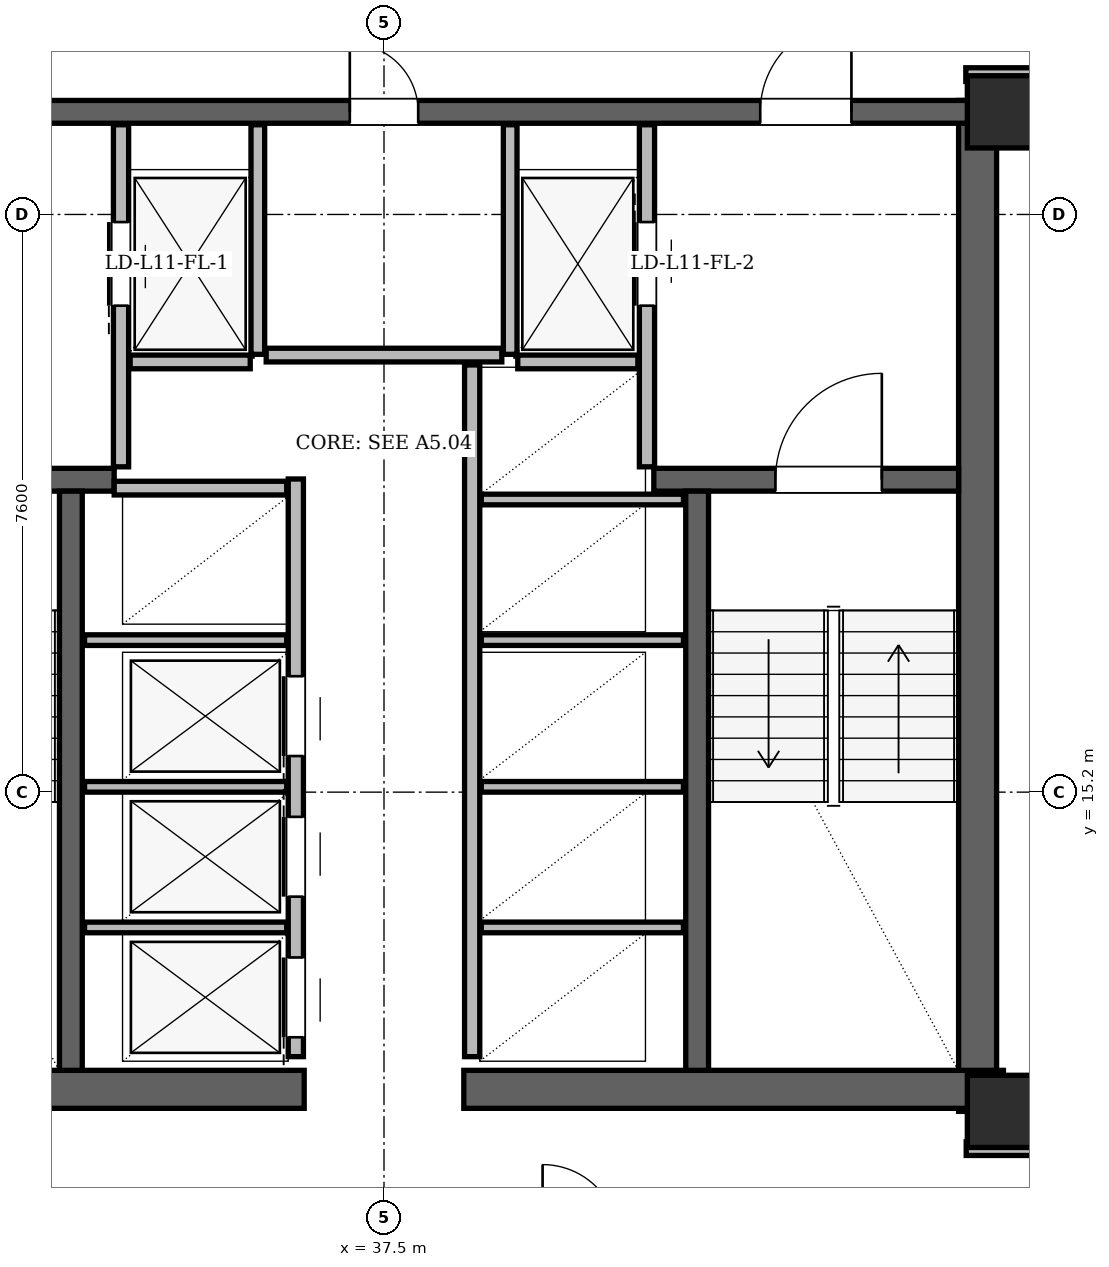
"""IFC4 building model, lengths in metres.
Left out: names, types, materials, properties, quantities, classifications, styles, units other than length and angle.
Written with IfcOpenShell. Run it as: python <this file> out.ifc"""

import sys

from ifc_helpers import new_model, si_unit, direction, frame, frame_2d, origin, origin_2d, place, context, subcontext, project, spatial, rectangle, hollow_rectangle, extrude, element, fill, save


model = new_model("IFC4")
c1 = context("Model", 3, precision=1e-05, world=origin(), true_north=direction((0.0, 1.0)))
c2 = subcontext(c1, "Body", "Model", "MODEL_VIEW")
j1 = project(units=[si_unit("LENGTHUNIT", "METRE"), si_unit("PLANEANGLEUNIT", "RADIAN")], contexts=[c1])
p1 = place(None, origin())
s1 = spatial("IfcSite", under=j1, at=p1, CompositionType="ELEMENT")
p2 = place(p1, origin())
s2 = spatial("IfcBuilding", under=s1, at=p2, CompositionType="ELEMENT")
p3 = place(p2, frame((0.0, 0.0, 45.3)))
s3 = spatial("IfcBuildingStorey", under=s2, at=p3, CompositionType="ELEMENT", Elevation=45.3)
for number, where, z_axis, x_axis in (
    (1, (45.65, 11.0, 0.0), (0.0, 0.0, 1.0), (1.0, 0.0, 0.0)),
    (2, (45.65, 24.15, 0.0), (0.0, 0.0, 1.0), (1.0, 0.0, 0.0)),
):
    element("IfcColumn", number, at=place(p3, frame(where, z_axis=z_axis, x_axis=x_axis)), inside=s3, PredefinedType="COLUMN", context=c2, shape_type="SweptSolid", body=[
        extrude(hollow_rectangle(XDim=0.95, YDim=0.95, WallThickness=0.08, at=origin_2d()), origin(), (0.0, 0.0, 1.0), 3.6),
    ])
p4 = place(p3, frame((45.31, 11.0, 0.0), z_axis=(0.0, 0.0, 1.0), x_axis=(0.0, 1.0, 0.0)))
e3 = element("IfcWall", 3, at=p4, inside=s3, PredefinedType="SHEAR", context=c2, shape_type="SweptSolid", body=[
    extrude(rectangle(XDim=13.3, YDim=0.5, at=frame_2d((6.65, 0.0))), origin(), (0.0, 0.0, 1.0), 3.36),
])
for number, where, z_axis, x_axis in (
    (4, (29.35, 11.29, 0.0), (0.0, 0.0, 1.0), (1.0, 0.0, 0.0)),
    (5, (38.55, 11.29, 0.0), (0.0, 0.0, 1.0), (1.0, 0.0, 0.0)),
):
    element("IfcWall", number, at=place(p3, frame(where, z_axis=z_axis, x_axis=x_axis)), inside=s3, PredefinedType="SHEAR", context=c2, shape_type="SweptSolid", body=[
        extrude(rectangle(XDim=7.1, YDim=0.5, at=frame_2d((3.55, 0.0))), origin(), (0.0, 0.0, 1.0), 3.36),
    ])
p5 = place(p3, frame((29.65, 24.15, 0.0), z_axis=(0.0, 0.0, 1.0), x_axis=(1.0, 0.0, 0.0)))
e6 = element("IfcWall", 6, at=p5, inside=s3, PredefinedType="SHEAR", context=c2, shape_type="SweptSolid", body=[
    extrude(rectangle(XDim=15.7, YDim=0.3, at=frame_2d((7.85, 0.0))), origin(), (0.0, 0.0, 1.0), 3.36),
])
p6 = place(p5, frame((1.7, 0.0, 0.0)))
e7 = element("IfcOpeningElement", 7, at=p6, cuts=e6, PredefinedType="OPENING", context=c2, shape_type="SweptSolid", body=[
    extrude(rectangle(XDim=1.2, YDim=2.2, at=frame_2d((0.6, 1.1))), frame((0.0, 0.15, 0.0), z_axis=(0.0, -1.0, 0.0), x_axis=(1.0, 0.0, 0.0)), (0.0, 0.0, 1.0), 0.3),
])
p7 = place(p5, frame((12.8, 0.0, 0.0)))
e8 = element("IfcOpeningElement", 8, at=p7, cuts=e6, PredefinedType="OPENING", context=c2, shape_type="SweptSolid", body=[
    extrude(rectangle(XDim=1.2, YDim=2.2, at=frame_2d((0.6, 1.1))), frame((0.0, 0.15, 0.0), z_axis=(0.0, -1.0, 0.0), x_axis=(1.0, 0.0, 0.0)), (0.0, 0.0, 1.0), 0.3),
])
p8 = place(p5, frame((7.4, 0.0, 0.0)))
e9 = element("IfcOpeningElement", 9, at=p8, cuts=e6, PredefinedType="OPENING", context=c2, shape_type="SweptSolid", body=[
    extrude(rectangle(XDim=0.9, YDim=2.05, at=frame_2d((0.45, 1.025))), frame((0.0, 0.15, 0.0), z_axis=(0.0, -1.0, 0.0), x_axis=(1.0, 0.0, 0.0)), (0.0, 0.0, 1.0), 0.3),
])
p9 = place(p3, frame((29.94, 19.31, 0.0), z_axis=(0.0, 0.0, 1.0), x_axis=(1.0, 0.0, 0.0)))
e10 = element("IfcWall", 10, at=p9, inside=s3, PredefinedType="SHEAR", context=c2, shape_type="SweptSolid", body=[
    extrude(rectangle(XDim=4.01, YDim=0.3, at=frame_2d((2.005, 0.0))), origin(), (0.0, 0.0, 1.0), 3.36),
])
p10 = place(p9, frame((1.01, 0.0, 0.0)))
e11 = element("IfcOpeningElement", 11, at=p10, cuts=e10, PredefinedType="OPENING", context=c2, shape_type="SweptSolid", body=[
    extrude(rectangle(XDim=1.4, YDim=2.2, at=frame_2d((0.7, 1.1))), frame((0.0, 0.15, 0.0), z_axis=(0.0, -1.0, 0.0), x_axis=(1.0, 0.0, 0.0)), (0.0, 0.0, 1.0), 0.3),
])
p11 = place(p3, frame((41.05, 19.31, 0.0), z_axis=(0.0, 0.0, 1.0), x_axis=(1.0, 0.0, 0.0)))
e12 = element("IfcWall", 12, at=p11, inside=s3, PredefinedType="SHEAR", context=c2, shape_type="SweptSolid", body=[
    extrude(rectangle(XDim=4.01, YDim=0.3, at=frame_2d((2.005, 0.0))), origin(), (0.0, 0.0, 1.0), 3.36),
])
p12 = place(p11, frame((1.6, 0.0, 0.0)))
e13 = element("IfcOpeningElement", 13, at=p12, cuts=e12, PredefinedType="OPENING", context=c2, shape_type="SweptSolid", body=[
    extrude(rectangle(XDim=1.4, YDim=2.2, at=frame_2d((0.7, 1.1))), frame((0.0, 0.15, 0.0), z_axis=(0.0, -1.0, 0.0), x_axis=(1.0, 0.0, 0.0)), (0.0, 0.0, 1.0), 0.3),
])
for number, where, z_axis, x_axis in (
    (14, (33.38, 11.54, 0.0), (0.0, 0.0, 1.0), (0.0, 1.0, 0.0)),
    (15, (41.62, 11.54, 0.0), (0.0, 0.0, 1.0), (0.0, 1.0, 0.0)),
):
    element("IfcWall", number, at=place(p3, frame(where, z_axis=z_axis, x_axis=x_axis)), inside=s3, PredefinedType="SHEAR", context=c2, shape_type="SweptSolid", body=[
        extrude(rectangle(XDim=7.62, YDim=0.3, at=frame_2d((3.81, 0.0))), origin(), (0.0, 0.0, 1.0), 3.36),
    ])
p13 = place(p3, frame((61.584, 14.829, 0.0), z_axis=(0.0, 0.0, 1.0), x_axis=(-0.500004112523, 0.866023029405, 0.0)))
e16 = element("IfcWall", 16, at=p13, inside=s3, PredefinedType="SOLIDWALL", context=c2, shape_type="SweptSolid", body=[
    extrude(rectangle(XDim=33.214, YDim=0.34, at=frame_2d((16.607, 0.0))), origin(), (0.0, 0.0, 1.0), 2.494),
])
p14 = place(p13, frame((7.615, 0.0, 0.0)))
e17 = element("IfcOpeningElement", 17, at=p14, cuts=e16, PredefinedType="OPENING", context=c2, shape_type="SweptSolid", body=[
    extrude(rectangle(XDim=1.5, YDim=2.2, at=frame_2d((0.75, 1.1))), frame((0.0, 0.17, 0.0), z_axis=(0.0, -1.0, 0.0), x_axis=(1.0, 0.0, 0.0)), (0.0, 0.0, 1.0), 0.34),
])
p15 = place(p13, frame((24.925, 0.0, 0.0)))
e18 = element("IfcOpeningElement", 18, at=p15, cuts=e16, PredefinedType="OPENING", context=c2, shape_type="SweptSolid", body=[
    extrude(rectangle(XDim=1.5, YDim=2.2, at=frame_2d((0.75, 1.1))), frame((0.0, 0.17, 0.0), z_axis=(0.0, -1.0, 0.0), x_axis=(1.0, 0.0, 0.0)), (0.0, 0.0, 1.0), 0.34),
])
p16 = place(p13, frame((0.971, 0.0, 0.85)))
e19 = element("IfcOpeningElement", 19, at=p16, cuts=e16, PredefinedType="OPENING", context=c2, shape_type="SweptSolid", body=[
    extrude(rectangle(XDim=1.2, YDim=1.48, at=frame_2d((0.6, 0.74))), frame((0.0, 0.17, 0.0), z_axis=(0.0, -1.0, 0.0), x_axis=(1.0, 0.0, 0.0)), (0.0, 0.0, 1.0), 0.34),
])
p17 = place(p13, frame((2.462, 0.0, 0.85)))
e20 = element("IfcOpeningElement", 20, at=p17, cuts=e16, PredefinedType="OPENING", context=c2, shape_type="SweptSolid", body=[
    extrude(rectangle(XDim=1.2, YDim=1.48, at=frame_2d((0.6, 0.74))), frame((0.0, 0.17, 0.0), z_axis=(0.0, -1.0, 0.0), x_axis=(1.0, 0.0, 0.0)), (0.0, 0.0, 1.0), 0.34),
])
p18 = place(p13, frame((16.965, 0.0, 0.85)))
e21 = element("IfcOpeningElement", 21, at=p18, cuts=e16, PredefinedType="OPENING", context=c2, shape_type="SweptSolid", body=[
    extrude(rectangle(XDim=2.8, YDim=1.534, at=frame_2d((1.4, 0.767))), frame((0.0, 0.17, 0.0), z_axis=(0.0, -1.0, 0.0), x_axis=(1.0, 0.0, 0.0)), (0.0, 0.0, 1.0), 0.34),
])
p19 = place(p13, frame((10.823, 0.0, 0.85)))
e22 = element("IfcOpeningElement", 22, at=p19, cuts=e16, PredefinedType="OPENING", context=c2, shape_type="SweptSolid", body=[
    extrude(rectangle(XDim=1.2, YDim=1.48, at=frame_2d((0.6, 0.74))), frame((0.0, 0.17, 0.0), z_axis=(0.0, -1.0, 0.0), x_axis=(1.0, 0.0, 0.0)), (0.0, 0.0, 1.0), 0.34),
])
p20 = place(p13, frame((13.666, 0.0, 0.85)))
e23 = element("IfcOpeningElement", 23, at=p20, cuts=e16, PredefinedType="OPENING", context=c2, shape_type="SweptSolid", body=[
    extrude(rectangle(XDim=1.2, YDim=1.48, at=frame_2d((0.6, 0.74))), frame((0.0, 0.17, 0.0), z_axis=(0.0, -1.0, 0.0), x_axis=(1.0, 0.0, 0.0)), (0.0, 0.0, 1.0), 0.34),
])
p21 = place(p13, frame((5.859, 0.0, 0.85)))
e24 = element("IfcOpeningElement", 24, at=p21, cuts=e16, PredefinedType="OPENING", context=c2, shape_type="SweptSolid", body=[
    extrude(rectangle(XDim=0.9, YDim=1.15, at=frame_2d((0.45, 0.575))), frame((0.0, 0.17, 0.0), z_axis=(0.0, -1.0, 0.0), x_axis=(1.0, 0.0, 0.0)), (0.0, 0.0, 1.0), 0.34),
])
p22 = place(p3, frame((34.04, 19.48, 0.0), z_axis=(0.0, 0.0, 1.0), x_axis=(0.0, 1.0, 0.0)))
e25 = element("IfcWall", 25, at=p22, inside=s3, PredefinedType="PARTITIONING", context=c2, shape_type="SweptSolid", body=[
    extrude(rectangle(XDim=4.5, YDim=0.2, at=frame_2d((2.25, 0.0))), origin(), (0.0, 0.0, 1.0), 2.4),
])
p23 = place(p22, frame((2.12, 0.0, 0.0)))
e26 = element("IfcOpeningElement", 26, at=p23, cuts=e25, PredefinedType="OPENING", context=c2, shape_type="SweptSolid", body=[
    extrude(rectangle(XDim=1.1, YDim=2.2, at=frame_2d((0.55, 1.1))), frame((0.0, 0.1, 0.0), z_axis=(0.0, -1.0, 0.0), x_axis=(1.0, 0.0, 0.0)), (0.0, 0.0, 1.0), 0.2),
])
p24 = place(p3, frame((35.84, 20.96, 0.0), z_axis=(0.0, 0.0, 1.0), x_axis=(0.0, 1.0, 0.0)))
e27 = element("IfcWall", 27, at=p24, inside=s3, PredefinedType="PARTITIONING", context=c2, shape_type="SweptSolid", body=[
    extrude(rectangle(XDim=3.02, YDim=0.18, at=frame_2d((1.51, 0.0))), origin(), (0.0, 0.0, 1.0), 2.4),
])
p25 = place(p3, frame((34.16, 20.86, 0.0), z_axis=(0.0, 0.0, 1.0), x_axis=(1.0, 0.0, 0.0)))
e28 = element("IfcWall", 28, at=p25, inside=s3, PredefinedType="PARTITIONING", context=c2, shape_type="SweptSolid", body=[
    extrude(rectangle(XDim=1.58, YDim=0.18, at=frame_2d((0.79, 0.0))), origin(), (0.0, 0.0, 1.0), 3.36),
])
p26 = place(p3, frame((40.96, 19.48, 0.0), z_axis=(0.0, 0.0, 1.0), x_axis=(0.0, 1.0, 0.0)))
e29 = element("IfcWall", 29, at=p26, inside=s3, PredefinedType="PARTITIONING", context=c2, shape_type="SweptSolid", body=[
    extrude(rectangle(XDim=4.5, YDim=0.2, at=frame_2d((2.25, 0.0))), origin(), (0.0, 0.0, 1.0), 2.4),
])
p27 = place(p26, frame((2.12, 0.0, 0.0)))
e30 = element("IfcOpeningElement", 30, at=p27, cuts=e29, PredefinedType="OPENING", context=c2, shape_type="SweptSolid", body=[
    extrude(rectangle(XDim=1.1, YDim=2.2, at=frame_2d((0.55, 1.1))), frame((0.0, 0.1, 0.0), z_axis=(0.0, -1.0, 0.0), x_axis=(1.0, 0.0, 0.0)), (0.0, 0.0, 1.0), 0.2),
])
p28 = place(p3, frame((39.16, 20.96, 0.0), z_axis=(0.0, 0.0, 1.0), x_axis=(0.0, 1.0, 0.0)))
e31 = element("IfcWall", 31, at=p28, inside=s3, PredefinedType="PARTITIONING", context=c2, shape_type="SweptSolid", body=[
    extrude(rectangle(XDim=3.02, YDim=0.18, at=frame_2d((1.51, 0.0))), origin(), (0.0, 0.0, 1.0), 2.4),
])
p29 = place(p3, frame((39.26, 20.86, 0.0), z_axis=(0.0, 0.0, 1.0), x_axis=(1.0, 0.0, 0.0)))
e32 = element("IfcWall", 32, at=p29, inside=s3, PredefinedType="PARTITIONING", context=c2, shape_type="SweptSolid", body=[
    extrude(rectangle(XDim=1.58, YDim=0.18, at=frame_2d((0.79, 0.0))), origin(), (0.0, 0.0, 1.0), 3.36),
])
p30 = place(p3, frame((36.34, 11.72, 0.0), z_axis=(0.0, 0.0, 1.0), x_axis=(0.0, 1.0, 0.0)))
e33 = element("IfcWall", 33, at=p30, inside=s3, PredefinedType="PARTITIONING", context=c2, shape_type="SweptSolid", body=[
    extrude(rectangle(XDim=7.6, YDim=0.2, at=frame_2d((3.8, 0.0))), origin(), (0.0, 0.0, 1.0), 3.36),
])
p31 = place(p30, frame((0.255, 0.0, 0.0)))
e34 = element("IfcOpeningElement", 34, at=p31, cuts=e33, PredefinedType="OPENING", context=c2, shape_type="SweptSolid", body=[
    extrude(rectangle(XDim=1.05, YDim=2.15, at=frame_2d((0.525, 1.075))), frame((0.0, 0.1, 0.0), z_axis=(0.0, -1.0, 0.0), x_axis=(1.0, 0.0, 0.0)), (0.0, 0.0, 1.0), 0.2),
])
p32 = place(p30, frame((2.105, 0.0, 0.0)))
e35 = element("IfcOpeningElement", 35, at=p32, cuts=e33, PredefinedType="OPENING", context=c2, shape_type="SweptSolid", body=[
    extrude(rectangle(XDim=1.05, YDim=2.15, at=frame_2d((0.525, 1.075))), frame((0.0, 0.1, 0.0), z_axis=(0.0, -1.0, 0.0), x_axis=(1.0, 0.0, 0.0)), (0.0, 0.0, 1.0), 0.2),
])
p33 = place(p30, frame((3.955, 0.0, 0.0)))
e36 = element("IfcOpeningElement", 36, at=p33, cuts=e33, PredefinedType="OPENING", context=c2, shape_type="SweptSolid", body=[
    extrude(rectangle(XDim=1.05, YDim=2.15, at=frame_2d((0.525, 1.075))), frame((0.0, 0.1, 0.0), z_axis=(0.0, -1.0, 0.0), x_axis=(1.0, 0.0, 0.0)), (0.0, 0.0, 1.0), 0.2),
])
p34 = place(p3, frame((33.95, 19.2, 0.0), z_axis=(0.0, 0.0, 1.0), x_axis=(1.0, 0.0, 0.0)))
e37 = element("IfcWall", 37, at=p34, inside=s3, PredefinedType="PARTITIONING", context=c2, shape_type="SweptSolid", body=[
    extrude(rectangle(XDim=2.27, YDim=0.18, at=frame_2d((1.135, 0.0))), origin(), (0.0, 0.0, 1.0), 3.36),
])
for number, where, z_axis, x_axis in (
    (38, (33.56, 13.42, 0.0), (0.0, 0.0, 1.0), (1.0, 0.0, 0.0)),
    (39, (33.56, 15.27, 0.0), (0.0, 0.0, 1.0), (1.0, 0.0, 0.0)),
    (40, (33.56, 17.2, 0.0), (0.0, 0.0, 1.0), (1.0, 0.0, 0.0)),
):
    element("IfcWall", number, at=place(p3, frame(where, z_axis=z_axis, x_axis=x_axis)), inside=s3, PredefinedType="PARTITIONING", context=c2, shape_type="SweptSolid", body=[
        extrude(rectangle(XDim=2.66, YDim=0.14, at=frame_2d((1.33, 0.0))), origin(), (0.0, 0.0, 1.0), 3.36),
    ])
p35 = place(p3, frame((38.66, 11.72, 0.0), z_axis=(0.0, 0.0, 1.0), x_axis=(0.0, 1.0, 0.0)))
e41 = element("IfcWall", 41, at=p35, inside=s3, PredefinedType="PARTITIONING", context=c2, shape_type="SweptSolid", body=[
    extrude(rectangle(XDim=9.1, YDim=0.2, at=frame_2d((4.55, 0.0))), origin(), (0.0, 0.0, 1.0), 3.36),
])
for number, where, z_axis, x_axis in (
    (42, (38.78, 13.42, 0.0), (0.0, 0.0, 1.0), (1.0, 0.0, 0.0)),
    (43, (38.78, 15.27, 0.0), (0.0, 0.0, 1.0), (1.0, 0.0, 0.0)),
    (44, (38.78, 17.2, 0.0), (0.0, 0.0, 1.0), (1.0, 0.0, 0.0)),
    (45, (38.78, 19.05, 0.0), (0.0, 0.0, 1.0), (1.0, 0.0, 0.0)),
):
    element("IfcWall", number, at=place(p3, frame(where, z_axis=z_axis, x_axis=x_axis)), inside=s3, PredefinedType="PARTITIONING", context=c2, shape_type="SweptSolid", body=[
        extrude(rectangle(XDim=2.66, YDim=0.14, at=frame_2d((1.33, 0.0))), origin(), (0.0, 0.0, 1.0), 3.36),
    ])
p36 = place(p3, frame((35.95, 20.95, 0.0), z_axis=(0.0, 0.0, 1.0), x_axis=(1.0, 0.0, 0.0)))
e46 = element("IfcWall", 46, at=p36, inside=s3, PredefinedType="PARTITIONING", context=c2, shape_type="SweptSolid", body=[
    extrude(rectangle(XDim=3.1, YDim=0.18, at=frame_2d((1.55, 0.0))), origin(), (0.0, 0.0, 1.0), 3.36),
])
p37 = place(p3, frame((45.16, 10.51, 0.0), z_axis=(0.0, 0.0, 1.0), x_axis=(1.0, 0.0, 0.0)))
e47 = element("IfcWall", 47, at=p37, inside=s3, PredefinedType="PARTITIONING", context=c2, shape_type="SweptSolid", body=[
    extrude(rectangle(XDim=0.98, YDim=0.18, at=frame_2d((0.49, 0.0))), origin(), (0.0, 0.0, 1.0), 2.738),
])
p38 = place(p3, frame((45.155, 24.64, 0.0), z_axis=(0.0, 0.0, 1.0), x_axis=(1.0, 0.0, 0.0)))
e48 = element("IfcWall", 48, at=p38, inside=s3, PredefinedType="PARTITIONING", context=c2, shape_type="SweptSolid", body=[
    extrude(rectangle(XDim=0.99, YDim=0.18, at=frame_2d((0.495, 0.0))), origin(), (0.0, 0.0, 1.0), 2.738),
])
p39 = place(p23, origin())
e49 = element("IfcDoor", 49, at=p39, inside=s3, OperationType="SLIDING_TO_LEFT", PredefinedType="DOOR", context=c2, shape_type="SweptSolid", body=[
    extrude(rectangle(XDim=1.1, YDim=2.2, at=frame_2d((0.55, 1.1))), frame((0.0, 0.025, 0.0), z_axis=(0.0, -1.0, 0.0), x_axis=(1.0, 0.0, 0.0)), (0.0, 0.0, 1.0), 0.05),
])
fill(e26, e49)
p40 = place(p27, origin())
e50 = element("IfcDoor", 50, at=p40, inside=s3, OperationType="SLIDING_TO_RIGHT", PredefinedType="DOOR", context=c2, shape_type="SweptSolid", body=[
    extrude(rectangle(XDim=1.1, YDim=2.2, at=frame_2d((0.55, 1.1))), frame((0.0, 0.025, 0.0), z_axis=(0.0, -1.0, 0.0), x_axis=(1.0, 0.0, 0.0)), (0.0, 0.0, 1.0), 0.05),
])
fill(e30, e50)
p41 = place(p31, origin())
e51 = element("IfcDoor", 51, at=p41, inside=s3, OperationType="SLIDING_TO_LEFT", PredefinedType="DOOR", context=c2, shape_type="SweptSolid", body=[
    extrude(rectangle(XDim=1.05, YDim=2.15, at=frame_2d((0.525, 1.075))), frame((0.0, 0.025, 0.0), z_axis=(0.0, -1.0, 0.0), x_axis=(1.0, 0.0, 0.0)), (0.0, 0.0, 1.0), 0.05),
])
fill(e34, e51)
p42 = place(p32, origin())
e52 = element("IfcDoor", 52, at=p42, inside=s3, OperationType="SLIDING_TO_RIGHT", PredefinedType="DOOR", context=c2, shape_type="SweptSolid", body=[
    extrude(rectangle(XDim=1.05, YDim=2.15, at=frame_2d((0.525, 1.075))), frame((0.0, 0.025, 0.0), z_axis=(0.0, -1.0, 0.0), x_axis=(1.0, 0.0, 0.0)), (0.0, 0.0, 1.0), 0.05),
])
fill(e35, e52)
p43 = place(p33, origin())
e53 = element("IfcDoor", 53, at=p43, inside=s3, OperationType="SLIDING_TO_LEFT", PredefinedType="DOOR", context=c2, shape_type="SweptSolid", body=[
    extrude(rectangle(XDim=1.05, YDim=2.15, at=frame_2d((0.525, 1.075))), frame((0.0, 0.025, 0.0), z_axis=(0.0, -1.0, 0.0), x_axis=(1.0, 0.0, 0.0)), (0.0, 0.0, 1.0), 0.05),
])
fill(e36, e53)
p44 = place(p12, origin())
e54 = element("IfcDoor", 54, at=p44, inside=s3, OperationType="SINGLE_SWING_RIGHT", PredefinedType="DOOR", context=c2, shape_type="SweptSolid", body=[
    extrude(rectangle(XDim=1.4, YDim=2.2, at=frame_2d((0.7, 1.1))), frame((0.0, 0.025, 0.0), z_axis=(0.0, -1.0, 0.0), x_axis=(1.0, 0.0, 0.0)), (0.0, 0.0, 1.0), 0.05),
])
fill(e13, e54)
p45 = place(p7, origin())
e55 = element("IfcDoor", 55, at=p45, inside=s3, OperationType="SINGLE_SWING_RIGHT", PredefinedType="DOOR", context=c2, shape_type="SweptSolid", body=[
    extrude(rectangle(XDim=1.2, YDim=2.2, at=frame_2d((0.6, 1.1))), frame((0.0, 0.025, 0.0), z_axis=(0.0, -1.0, 0.0), x_axis=(1.0, 0.0, 0.0)), (0.0, 0.0, 1.0), 0.05),
])
fill(e8, e55)
p46 = place(p8, origin())
e56 = element("IfcDoor", 56, at=p46, inside=s3, OperationType="SINGLE_SWING_LEFT", PredefinedType="DOOR", context=c2, shape_type="SweptSolid", body=[
    extrude(rectangle(XDim=0.9, YDim=2.05, at=frame_2d((0.45, 1.025))), frame((0.0, 0.025, 0.0), z_axis=(0.0, -1.0, 0.0), x_axis=(1.0, 0.0, 0.0)), (0.0, 0.0, 1.0), 0.05),
])
fill(e9, e56)
save(model, sys.argv[1])
